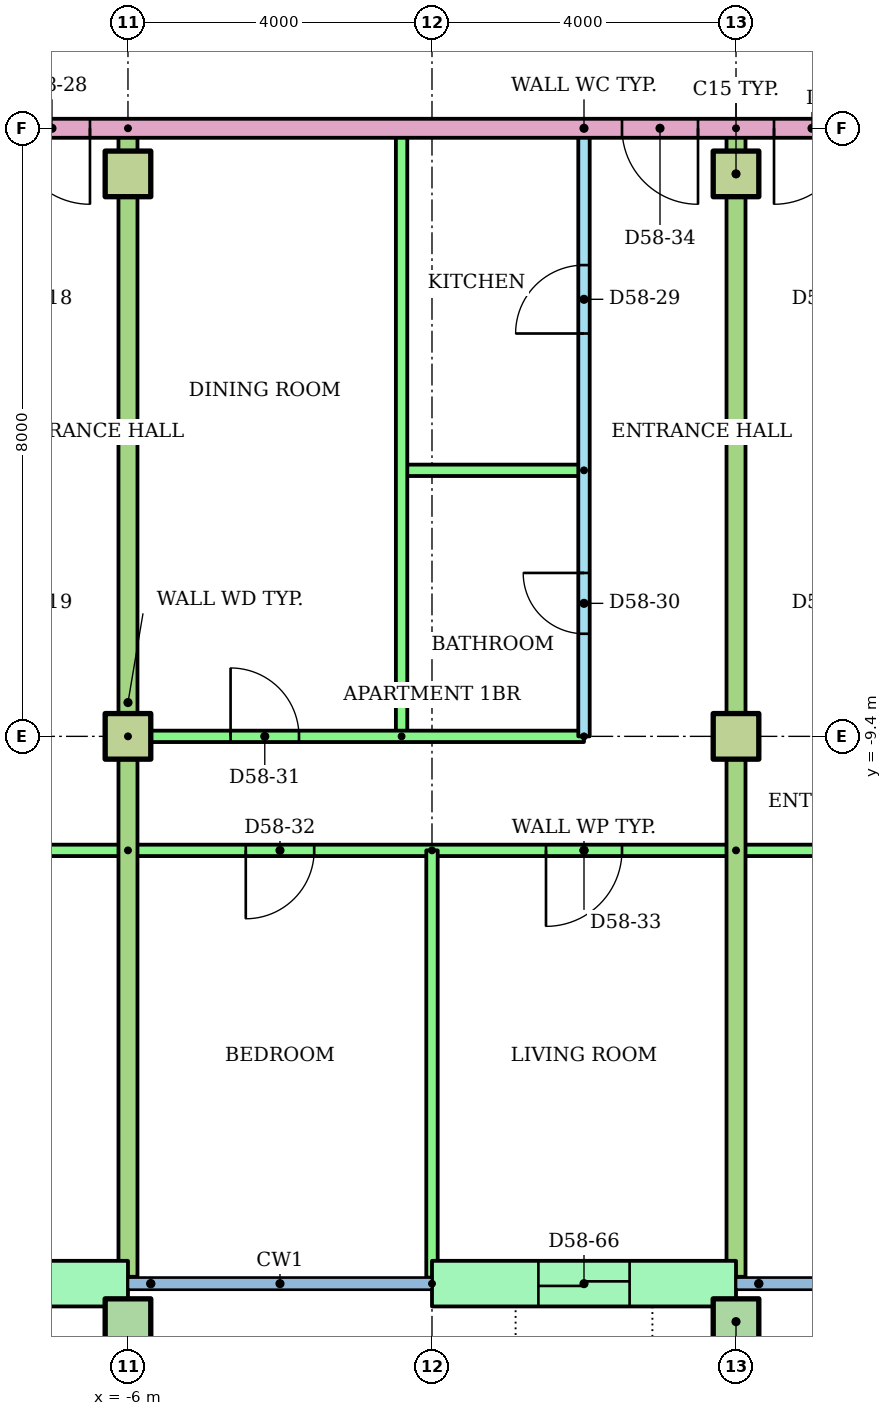
"""IFC4 building model, lengths in metres.
Left out: names, types, materials, properties, quantities, classifications, styles, units other than length and angle.
Written with IfcOpenShell. Run it as: python <this file> out.ifc"""

import sys

from ifc_helpers import new_model, si_unit, direction, frame, frame_2d, origin, origin_2d, place, context, subcontext, project, spatial, rectangle, hollow_rectangle, extrude, element, fill, save


model = new_model("IFC4")
c1 = context("Model", 3, precision=1e-05, world=origin(), true_north=direction((0.0, 1.0)))
c2 = subcontext(c1, "Body", "Model", "MODEL_VIEW")
j1 = project(units=[si_unit("LENGTHUNIT", "METRE"), si_unit("PLANEANGLEUNIT", "RADIAN")], contexts=[c1])
p1 = place(None, origin())
s1 = spatial("IfcSite", under=j1, at=p1, CompositionType="ELEMENT")
p2 = place(p1, origin())
s2 = spatial("IfcBuilding", under=s1, at=p2, CompositionType="ELEMENT")
p3 = place(p2, frame((0.0, 0.0, 223.6)))
s3 = spatial("IfcBuildingStorey", under=s2, at=p3, CompositionType="ELEMENT", Elevation=223.6)
for number, where in (
    (1, (-6.0, -17.1, 0.0)),
    (2, (2.0, -17.1, 0.0)),
):
    element("IfcColumn", number, at=place(p3, frame(where)), inside=s3, PredefinedType="COLUMN", context=c2, shape_type="SweptSolid", body=[
        extrude(hollow_rectangle(XDim=0.6, YDim=0.6, WallThickness=0.03, at=origin_2d()), origin(), (0.0, 0.0, 1.0), 3.2),
    ])
for number, where in (
    (3, (-6.0, -9.4, 0.0)),
    (4, (2.0, -9.4, 0.0)),
    (5, (-6.0, -2.0, 0.0)),
    (6, (2.0, -2.0, 0.0)),
):
    element("IfcColumn", number, at=place(p3, frame(where)), inside=s3, PredefinedType="COLUMN", context=c2, shape_type="SweptSolid", body=[
        extrude(rectangle(XDim=0.6, YDim=0.6, at=origin_2d()), origin(), (0.0, 0.0, 1.0), 3.2),
    ])
p4 = place(p3, frame((-10.0, -16.6, 0.0)))
e7 = element("IfcWall", 7, at=p4, inside=s3, PredefinedType="STANDARD", context=c2, shape_type="SweptSolid", body=[
    extrude(rectangle(XDim=4.0, YDim=0.6, at=frame_2d((2.0, 0.0))), origin(), (0.0, 0.0, 1.0), 2.92),
])
p5 = place(p4, frame((1.4, 0.0, 0.0)))
e8 = element("IfcOpeningElement", 8, at=p5, cuts=e7, PredefinedType="OPENING", context=c2, shape_type="SweptSolid", body=[
    extrude(rectangle(XDim=1.2, YDim=2.1, at=frame_2d((0.6, 1.05))), frame((0.0, 0.31, 0.0), z_axis=(0.0, -1.0, 0.0), x_axis=(1.0, 0.0, 0.0)), (0.0, 0.0, 1.0), 0.62),
])
p6 = place(p3, frame((-2.0, -16.6, 0.0)))
e9 = element("IfcWall", 9, at=p6, inside=s3, PredefinedType="STANDARD", context=c2, shape_type="SweptSolid", body=[
    extrude(rectangle(XDim=4.0, YDim=0.6, at=frame_2d((2.0, 0.0))), origin(), (0.0, 0.0, 1.0), 2.92),
])
p7 = place(p6, frame((1.4, 0.0, 0.0)))
e10 = element("IfcOpeningElement", 10, at=p7, cuts=e9, PredefinedType="OPENING", context=c2, shape_type="SweptSolid", body=[
    extrude(rectangle(XDim=1.2, YDim=2.1, at=frame_2d((0.6, 1.05))), frame((0.0, 0.31, 0.0), z_axis=(0.0, -1.0, 0.0), x_axis=(1.0, 0.0, 0.0)), (0.0, 0.0, 1.0), 0.62),
])
p8 = place(p3, frame((-6.0, -10.9, 0.0), z_axis=(0.0, 0.0, 1.0), x_axis=(-1.0, 0.0, 0.0)))
e11 = element("IfcWall", 11, at=p8, inside=s3, PredefinedType="PARTITIONING", context=c2, shape_type="SweptSolid", body=[
    extrude(rectangle(XDim=22.92, YDim=0.15, at=frame_2d((11.46, 0.0))), origin(), (0.0, 0.0, 1.0), 2.4),
])
p9 = place(p8, frame((20.0, 0.0, 0.0)))
e12 = element("IfcOpeningElement", 12, at=p9, cuts=e11, PredefinedType="OPENING", context=c2, shape_type="SweptSolid", body=[
    extrude(rectangle(XDim=0.9, YDim=2.1, at=frame_2d((0.45, 1.05))), frame((0.0, 0.085, 0.0), z_axis=(0.0, -1.0, 0.0), x_axis=(1.0, 0.0, 0.0)), (0.0, 0.0, 1.0), 0.17),
])
p10 = place(p8, frame((14.624, 0.0, 0.0)))
e13 = element("IfcOpeningElement", 13, at=p10, cuts=e11, PredefinedType="OPENING", context=c2, shape_type="SweptSolid", body=[
    extrude(rectangle(XDim=0.9, YDim=2.1, at=frame_2d((0.45, 1.05))), frame((0.0, 0.085, 0.0), z_axis=(0.0, -1.0, 0.0), x_axis=(1.0, 0.0, 0.0)), (0.0, 0.0, 1.0), 0.17),
])
p11 = place(p8, frame((9.55, 0.0, 0.0)))
e14 = element("IfcOpeningElement", 14, at=p11, cuts=e11, PredefinedType="OPENING", context=c2, shape_type="SweptSolid", body=[
    extrude(rectangle(XDim=0.9, YDim=2.1, at=frame_2d((0.45, 1.05))), frame((0.0, 0.085, 0.0), z_axis=(0.0, -1.0, 0.0), x_axis=(1.0, 0.0, 0.0)), (0.0, 0.0, 1.0), 0.17),
])
p12 = place(p8, frame((5.55, 0.0, 0.0)))
e15 = element("IfcOpeningElement", 15, at=p12, cuts=e11, PredefinedType="OPENING", context=c2, shape_type="SweptSolid", body=[
    extrude(rectangle(XDim=0.9, YDim=2.1, at=frame_2d((0.45, 1.05))), frame((0.0, 0.085, 0.0), z_axis=(0.0, -1.0, 0.0), x_axis=(1.0, 0.0, 0.0)), (0.0, 0.0, 1.0), 0.17),
])
p13 = place(p8, frame((1.5, 0.0, 0.0)))
e16 = element("IfcOpeningElement", 16, at=p13, cuts=e11, PredefinedType="OPENING", context=c2, shape_type="SweptSolid", body=[
    extrude(rectangle(XDim=1.0, YDim=2.1, at=frame_2d((0.5, 1.05))), frame((0.0, 0.085, 0.0), z_axis=(0.0, -1.0, 0.0), x_axis=(1.0, 0.0, 0.0)), (0.0, 0.0, 1.0), 0.17),
])
p14 = place(p3, frame((0.0, -9.4, 0.0), z_axis=(0.0, 0.0, 1.0), x_axis=(0.0, 1.0, 0.0)))
e17 = element("IfcWall", 17, at=p14, inside=s3, PredefinedType="PARTITIONING", context=c2, shape_type="SweptSolid", body=[
    extrude(rectangle(XDim=8.0, YDim=0.15, at=frame_2d((4.0, 0.0))), origin(), (0.0, 0.0, 1.0), 2.4),
])
p15 = place(p14, frame((5.3, 0.0, 0.0)))
e18 = element("IfcOpeningElement", 18, at=p15, cuts=e17, PredefinedType="OPENING", context=c2, shape_type="SweptSolid", body=[
    extrude(rectangle(XDim=0.9, YDim=2.1, at=frame_2d((0.45, 1.05))), frame((0.0, 0.085, 0.0), z_axis=(0.0, -1.0, 0.0), x_axis=(1.0, 0.0, 0.0)), (0.0, 0.0, 1.0), 0.17),
])
p16 = place(p14, frame((1.35, 0.0, 0.0)))
e19 = element("IfcOpeningElement", 19, at=p16, cuts=e17, PredefinedType="OPENING", context=c2, shape_type="SweptSolid", body=[
    extrude(rectangle(XDim=0.8, YDim=2.1, at=frame_2d((0.4, 1.05))), frame((0.0, 0.085, 0.0), z_axis=(0.0, -1.0, 0.0), x_axis=(1.0, 0.0, 0.0)), (0.0, 0.0, 1.0), 0.17),
])
p17 = place(p3, frame((0.0, -5.9, 0.0), z_axis=(0.0, 0.0, 1.0), x_axis=(-1.0, 0.0, 0.0)))
e20 = element("IfcWall", 20, at=p17, inside=s3, PredefinedType="PARTITIONING", context=c2, shape_type="SweptSolid", body=[
    extrude(rectangle(XDim=2.4, YDim=0.15, at=frame_2d((1.2, 0.0))), origin(), (0.0, 0.0, 1.0), 2.4),
])
p18 = place(p3, frame((-2.4, -9.4, 0.0), z_axis=(0.0, 0.0, 1.0), x_axis=(0.0, 1.0, 0.0)))
e21 = element("IfcWall", 21, at=p18, inside=s3, PredefinedType="PARTITIONING", context=c2, shape_type="SweptSolid", body=[
    extrude(rectangle(XDim=8.0, YDim=0.15, at=frame_2d((4.0, 0.0))), origin(), (0.0, 0.0, 1.0), 2.4),
])
p19 = place(p3, frame((-6.0, -9.4, 0.0)))
e22 = element("IfcWall", 22, at=p19, inside=s3, PredefinedType="PARTITIONING", context=c2, shape_type="SweptSolid", body=[
    extrude(rectangle(XDim=6.0, YDim=0.15, at=frame_2d((3.0, 0.0))), origin(), (0.0, 0.0, 1.0), 2.4),
])
p20 = place(p19, frame((1.35, 0.0, 0.0)))
e23 = element("IfcOpeningElement", 23, at=p20, cuts=e22, PredefinedType="OPENING", context=c2, shape_type="SweptSolid", body=[
    extrude(rectangle(XDim=0.9, YDim=2.1, at=frame_2d((0.45, 1.05))), frame((0.0, 0.085, 0.0), z_axis=(0.0, -1.0, 0.0), x_axis=(1.0, 0.0, 0.0)), (0.0, 0.0, 1.0), 0.17),
])
p21 = place(p3, frame((2.0, -10.9, 0.0), z_axis=(0.0, 0.0, 1.0), x_axis=(-1.0, 0.0, 0.0)))
e24 = element("IfcWall", 24, at=p21, inside=s3, PredefinedType="PARTITIONING", context=c2, shape_type="SweptSolid", body=[
    extrude(rectangle(XDim=8.0, YDim=0.15, at=frame_2d((4.0, 0.0))), origin(), (0.0, 0.0, 1.0), 2.4),
])
p22 = place(p21, frame((5.55, 0.0, 0.0)))
e25 = element("IfcOpeningElement", 25, at=p22, cuts=e24, PredefinedType="OPENING", context=c2, shape_type="SweptSolid", body=[
    extrude(rectangle(XDim=0.9, YDim=2.1, at=frame_2d((0.45, 1.05))), frame((0.0, 0.085, 0.0), z_axis=(0.0, -1.0, 0.0), x_axis=(1.0, 0.0, 0.0)), (0.0, 0.0, 1.0), 0.17),
])
p23 = place(p21, frame((1.5, 0.0, 0.0)))
e26 = element("IfcOpeningElement", 26, at=p23, cuts=e24, PredefinedType="OPENING", context=c2, shape_type="SweptSolid", body=[
    extrude(rectangle(XDim=1.0, YDim=2.1, at=frame_2d((0.5, 1.05))), frame((0.0, 0.085, 0.0), z_axis=(0.0, -1.0, 0.0), x_axis=(1.0, 0.0, 0.0)), (0.0, 0.0, 1.0), 0.17),
])
p24 = place(p3, frame((-2.0, -10.9, 0.0), z_axis=(0.0, 0.0, 1.0), x_axis=(0.0, -1.0, 0.0)))
e27 = element("IfcWall", 27, at=p24, inside=s3, PredefinedType="PARTITIONING", context=c2, shape_type="SweptSolid", body=[
    extrude(rectangle(XDim=5.621, YDim=0.15, at=frame_2d((2.811, 0.0))), origin(), (0.0, 0.0, 1.0), 2.4),
])
p25 = place(p3, frame((-6.0, -1.4, 0.0), z_axis=(0.0, 0.0, 1.0), x_axis=(0.0, -1.0, 0.0)))
e28 = element("IfcWall", 28, at=p25, inside=s3, PredefinedType="PARTITIONING", context=c2, shape_type="SweptSolid", body=[
    extrude(rectangle(XDim=15.11, YDim=0.25, at=frame_2d((7.555, 0.0))), origin(), (0.0, 0.0, 1.0), 2.4),
])
p26 = place(p3, frame((28.92, -10.9, 0.0), z_axis=(0.0, 0.0, 1.0), x_axis=(-1.0, 0.0, 0.0)))
e29 = element("IfcWall", 29, at=p26, inside=s3, PredefinedType="PARTITIONING", context=c2, shape_type="SweptSolid", body=[
    extrude(rectangle(XDim=26.92, YDim=0.15, at=frame_2d((13.46, 0.0))), origin(), (0.0, 0.0, 1.0), 2.4),
])
p27 = place(p26, frame((22.42, 0.0, 0.0)))
e30 = element("IfcOpeningElement", 30, at=p27, cuts=e29, PredefinedType="OPENING", context=c2, shape_type="SweptSolid", body=[
    extrude(rectangle(XDim=1.0, YDim=2.1, at=frame_2d((0.5, 1.05))), frame((0.0, 0.085, 0.0), z_axis=(0.0, -1.0, 0.0), x_axis=(1.0, 0.0, 0.0)), (0.0, 0.0, 1.0), 0.17),
])
p28 = place(p26, frame((16.47, 0.0, 0.0)))
e31 = element("IfcOpeningElement", 31, at=p28, cuts=e29, PredefinedType="OPENING", context=c2, shape_type="SweptSolid", body=[
    extrude(rectangle(XDim=0.9, YDim=2.1, at=frame_2d((0.45, 1.05))), frame((0.0, 0.085, 0.0), z_axis=(0.0, -1.0, 0.0), x_axis=(1.0, 0.0, 0.0)), (0.0, 0.0, 1.0), 0.17),
])
p29 = place(p26, frame((12.47, 0.0, 0.0)))
e32 = element("IfcOpeningElement", 32, at=p29, cuts=e29, PredefinedType="OPENING", context=c2, shape_type="SweptSolid", body=[
    extrude(rectangle(XDim=0.9, YDim=2.1, at=frame_2d((0.45, 1.05))), frame((0.0, 0.085, 0.0), z_axis=(0.0, -1.0, 0.0), x_axis=(1.0, 0.0, 0.0)), (0.0, 0.0, 1.0), 0.17),
])
p30 = place(p26, frame((7.27, 0.0, 0.0)))
e33 = element("IfcOpeningElement", 33, at=p30, cuts=e29, PredefinedType="OPENING", context=c2, shape_type="SweptSolid", body=[
    extrude(rectangle(XDim=0.9, YDim=2.1, at=frame_2d((0.45, 1.05))), frame((0.0, 0.085, 0.0), z_axis=(0.0, -1.0, 0.0), x_axis=(1.0, 0.0, 0.0)), (0.0, 0.0, 1.0), 0.17),
])
p31 = place(p26, frame((1.544, 0.0, 0.0)))
e34 = element("IfcOpeningElement", 34, at=p31, cuts=e29, PredefinedType="OPENING", context=c2, shape_type="SweptSolid", body=[
    extrude(rectangle(XDim=0.9, YDim=2.1, at=frame_2d((0.45, 1.05))), frame((0.0, 0.085, 0.0), z_axis=(0.0, -1.0, 0.0), x_axis=(1.0, 0.0, 0.0)), (0.0, 0.0, 1.0), 0.17),
])
p32 = place(p3, frame((2.0, -1.4, 0.0), z_axis=(0.0, 0.0, 1.0), x_axis=(0.0, -1.0, 0.0)))
e35 = element("IfcWall", 35, at=p32, inside=s3, PredefinedType="PARTITIONING", context=c2, shape_type="SweptSolid", body=[
    extrude(rectangle(XDim=15.11, YDim=0.25, at=frame_2d((7.555, 0.0))), origin(), (0.0, 0.0, 1.0), 2.4),
])
p33 = place(p3, frame((14.0, -1.4, 0.0), z_axis=(0.0, 0.0, 1.0), x_axis=(-1.0, 0.0, 0.0)))
e36 = element("IfcWall", 36, at=p33, inside=s3, PredefinedType="PARTITIONING", context=c2, shape_type="SweptSolid", body=[
    extrude(rectangle(XDim=28.0, YDim=0.25, at=frame_2d((14.0, 0.0))), origin(), (0.0, 0.0, 1.0), 2.4),
])
p34 = place(p33, frame((20.5, 0.0, 0.0)))
e37 = element("IfcOpeningElement", 37, at=p34, cuts=e36, PredefinedType="OPENING", context=c2, shape_type="SweptSolid", body=[
    extrude(rectangle(XDim=1.0, YDim=2.1, at=frame_2d((0.5, 1.05))), frame((0.0, 0.135, 0.0), z_axis=(0.0, -1.0, 0.0), x_axis=(1.0, 0.0, 0.0)), (0.0, 0.0, 1.0), 0.27),
])
p35 = place(p33, frame((12.5, 0.0, 0.0)))
e38 = element("IfcOpeningElement", 38, at=p35, cuts=e36, PredefinedType="OPENING", context=c2, shape_type="SweptSolid", body=[
    extrude(rectangle(XDim=1.0, YDim=2.1, at=frame_2d((0.5, 1.05))), frame((0.0, 0.135, 0.0), z_axis=(0.0, -1.0, 0.0), x_axis=(1.0, 0.0, 0.0)), (0.0, 0.0, 1.0), 0.27),
])
p36 = place(p33, frame((10.5, 0.0, 0.0)))
e39 = element("IfcOpeningElement", 39, at=p36, cuts=e36, PredefinedType="OPENING", context=c2, shape_type="SweptSolid", body=[
    extrude(rectangle(XDim=1.0, YDim=2.1, at=frame_2d((0.5, 1.05))), frame((0.0, 0.135, 0.0), z_axis=(0.0, -1.0, 0.0), x_axis=(1.0, 0.0, 0.0)), (0.0, 0.0, 1.0), 0.27),
])
p37 = place(p34, origin())
e40 = element("IfcDoor", 40, at=p37, inside=s3, OperationType="SINGLE_SWING_LEFT", PredefinedType="DOOR", context=c2, shape_type="SweptSolid", body=[
    extrude(rectangle(XDim=1.0, YDim=2.1, at=frame_2d((0.5, 1.05))), frame((0.0, 0.025, 0.0), z_axis=(0.0, -1.0, 0.0), x_axis=(1.0, 0.0, 0.0)), (0.0, 0.0, 1.0), 0.05),
])
fill(e37, e40)
p38 = place(p15, origin())
e41 = element("IfcDoor", 41, at=p38, inside=s3, OperationType="SINGLE_SWING_LEFT", PredefinedType="DOOR", context=c2, shape_type="SweptSolid", body=[
    extrude(rectangle(XDim=0.9, YDim=2.1, at=frame_2d((0.45, 1.05))), frame((0.0, 0.025, 0.0), z_axis=(0.0, -1.0, 0.0), x_axis=(1.0, 0.0, 0.0)), (0.0, 0.0, 1.0), 0.05),
])
fill(e18, e41)
p39 = place(p16, origin())
e42 = element("IfcDoor", 42, at=p39, inside=s3, OperationType="SINGLE_SWING_RIGHT", PredefinedType="DOOR", context=c2, shape_type="SweptSolid", body=[
    extrude(rectangle(XDim=0.8, YDim=2.1, at=frame_2d((0.4, 1.05))), frame((0.0, 0.025, 0.0), z_axis=(0.0, -1.0, 0.0), x_axis=(1.0, 0.0, 0.0)), (0.0, 0.0, 1.0), 0.05),
])
fill(e19, e42)
p40 = place(p20, origin())
e43 = element("IfcDoor", 43, at=p40, inside=s3, OperationType="SINGLE_SWING_LEFT", PredefinedType="DOOR", context=c2, shape_type="SweptSolid", body=[
    extrude(rectangle(XDim=0.9, YDim=2.1, at=frame_2d((0.45, 1.05))), frame((0.0, 0.025, 0.0), z_axis=(0.0, -1.0, 0.0), x_axis=(1.0, 0.0, 0.0)), (0.0, 0.0, 1.0), 0.05),
])
fill(e23, e43)
p41 = place(p22, origin())
e44 = element("IfcDoor", 44, at=p41, inside=s3, OperationType="SINGLE_SWING_RIGHT", PredefinedType="DOOR", context=c2, shape_type="SweptSolid", body=[
    extrude(rectangle(XDim=0.9, YDim=2.1, at=frame_2d((0.45, 1.05))), frame((0.0, 0.025, 0.0), z_axis=(0.0, -1.0, 0.0), x_axis=(1.0, 0.0, 0.0)), (0.0, 0.0, 1.0), 0.05),
])
fill(e25, e44)
p42 = place(p23, origin())
e45 = element("IfcDoor", 45, at=p42, inside=s3, OperationType="SINGLE_SWING_RIGHT", PredefinedType="DOOR", context=c2, shape_type="SweptSolid", body=[
    extrude(rectangle(XDim=1.0, YDim=2.1, at=frame_2d((0.5, 1.05))), frame((0.0, 0.025, 0.0), z_axis=(0.0, -1.0, 0.0), x_axis=(1.0, 0.0, 0.0)), (0.0, 0.0, 1.0), 0.05),
])
fill(e26, e45)
p43 = place(p35, origin())
e46 = element("IfcDoor", 46, at=p43, inside=s3, OperationType="SINGLE_SWING_LEFT", PredefinedType="DOOR", context=c2, shape_type="SweptSolid", body=[
    extrude(rectangle(XDim=1.0, YDim=2.1, at=frame_2d((0.5, 1.05))), frame((0.0, 0.025, 0.0), z_axis=(0.0, -1.0, 0.0), x_axis=(1.0, 0.0, 0.0)), (0.0, 0.0, 1.0), 0.05),
])
fill(e38, e46)
p44 = place(p36, origin())
e47 = element("IfcDoor", 47, at=p44, inside=s3, OperationType="SINGLE_SWING_RIGHT", PredefinedType="DOOR", context=c2, shape_type="SweptSolid", body=[
    extrude(rectangle(XDim=1.0, YDim=2.1, at=frame_2d((0.5, 1.05))), frame((0.0, 0.025, 0.0), z_axis=(0.0, -1.0, 0.0), x_axis=(1.0, 0.0, 0.0)), (0.0, 0.0, 1.0), 0.05),
])
fill(e39, e47)
p45 = place(p7, origin())
e48 = element("IfcDoor", 48, at=p45, inside=s3, OperationType="SLIDING_TO_LEFT", PredefinedType="DOOR", context=c2, shape_type="SweptSolid", body=[
    extrude(rectangle(XDim=1.2, YDim=2.1, at=frame_2d((0.6, 1.05))), frame((0.0, 0.025, 0.0), z_axis=(0.0, -1.0, 0.0), x_axis=(1.0, 0.0, 0.0)), (0.0, 0.0, 1.0), 0.05),
])
fill(e10, e48)
save(model, sys.argv[1])
